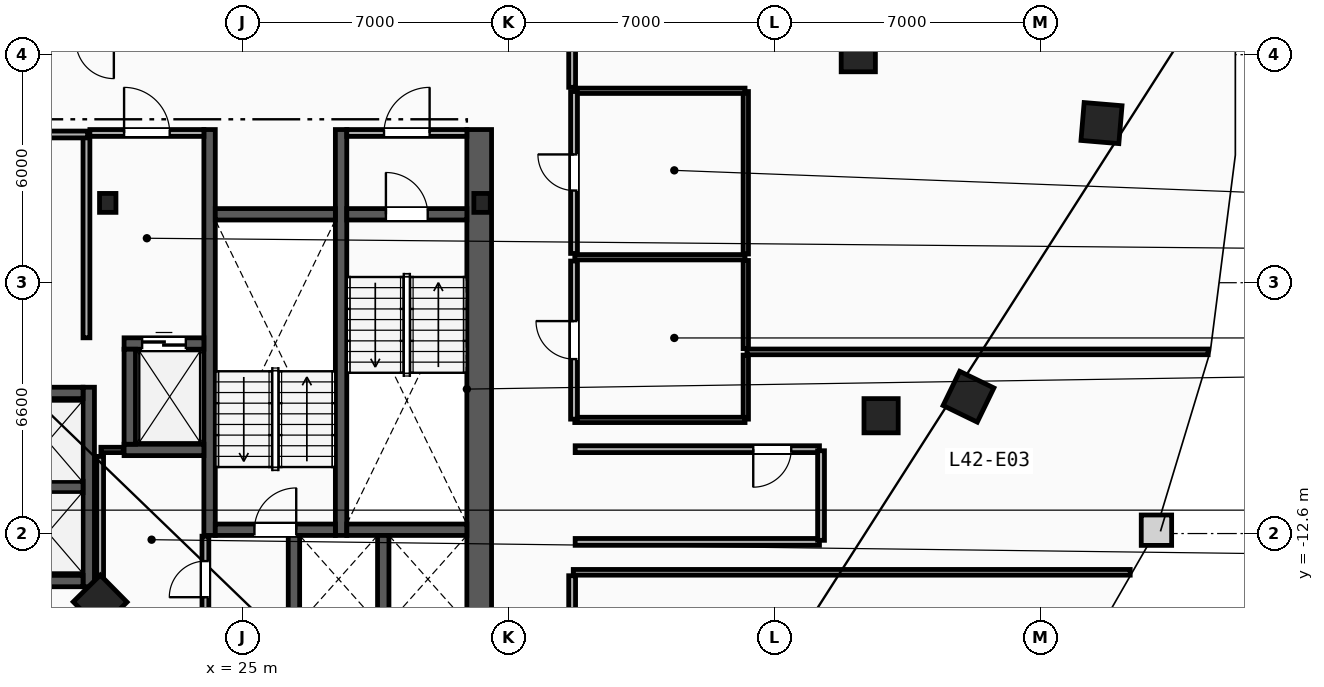
"""IFC4 building model, lengths in metres.
Left out: names, types, materials, properties, quantities, classifications, styles, units other than length and angle.
Written with IfcOpenShell. Run it as: python <this file> out.ifc"""

import sys

from ifc_helpers import new_model, si_unit, direction, frame, frame_2d, origin, origin_2d, place, context, subcontext, project, spatial, rectangle, i_section, extrude, element, fill, save


model = new_model("IFC4")
c1 = context("Model", 3, precision=1e-05, world=origin(), true_north=direction((0.0, 1.0)))
c2 = subcontext(c1, "Body", "Model", "MODEL_VIEW")
j1 = project(units=[si_unit("LENGTHUNIT", "METRE"), si_unit("PLANEANGLEUNIT", "RADIAN")], contexts=[c1])
p1 = place(None, origin())
s1 = spatial("IfcSite", under=j1, at=p1, CompositionType="ELEMENT")
p2 = place(p1, origin())
s2 = spatial("IfcBuilding", under=s1, at=p2, CompositionType="ELEMENT")
p3 = place(p2, frame((0.0, 0.0, 162.0)))
s3 = spatial("IfcBuildingStorey", under=s2, at=p3, CompositionType="ELEMENT", Elevation=162.0)
for number, where, z_axis, x_axis in (
    (1, (31.3, -3.9, 0.0), (0.0, 0.0, 1.0), (1.0, 0.0, 0.0)),
    (2, (21.45, -3.9, 0.0), (0.0, 0.0, 1.0), (1.0, 0.0, 0.0)),
):
    element("IfcColumn", number, at=place(p3, frame(where, z_axis=z_axis, x_axis=x_axis)), inside=s3, PredefinedType="COLUMN", context=c2, shape_type="SweptSolid", body=[
        extrude(i_section(OverallWidth=0.432, OverallDepth=0.498, WebThickness=0.056, FlangeThickness=0.089, FilletRadius=0.018, at=origin_2d()), origin(), (0.0, 0.0, 1.0), 3.6),
    ])
for number, where, z_axis, x_axis in (
    (3, (41.2, 0.0, 0.0), (0.0, 0.0, 1.0), (1.0, 0.0, 0.0)),
    (4, (41.8, -9.5, 0.0), (0.0, 0.0, 1.0), (1.0, 0.0, 0.0)),
):
    element("IfcColumn", number, at=place(p3, frame(where, z_axis=z_axis, x_axis=x_axis)), inside=s3, PredefinedType="COLUMN", context=c2, shape_type="SweptSolid", body=[
        extrude(rectangle(XDim=0.9, YDim=0.9, at=origin_2d()), origin(), (0.0, 0.0, 1.0), 3.6),
    ])
for number, where, z_axis, x_axis in (
    (5, (21.25, -14.4, 0.0), (0.0, 0.0, 1.0), (0.703, -0.711, 0.0)),
    (6, (44.1, -9.0, 0.0), (0.0, 0.0, 1.0), (0.437, 0.899, 0.0)),
    (7, (47.6, -1.8, 0.0), (0.0, 0.0, 1.0), (0.084, 0.997, 0.0)),
):
    element("IfcColumn", number, at=place(p3, frame(where, z_axis=z_axis, x_axis=x_axis)), inside=s3, PredefinedType="COLUMN", context=c2, shape_type="SweptSolid", body=[
        extrude(rectangle(XDim=1.0, YDim=1.0, at=origin_2d()), origin(), (0.0, 0.0, 1.0), 3.6),
    ])
p4 = place(p3, frame((31.225, -15.3, 0.0), z_axis=(0.0, 0.0, 1.0), x_axis=(0.0, 1.0, 0.0)))
e8 = element("IfcWall", 8, at=p4, inside=s3, PredefinedType="SHEAR", context=c2, shape_type="SweptSolid", body=[
    extrude(rectangle(XDim=13.33, YDim=0.65, at=frame_2d((6.665, 0.0))), origin(), (0.0, 0.0, 1.0), 3.36),
])
for number, where, z_axis, x_axis in (
    (9, (27.59, -12.65, 0.0), (0.0, 0.0, 1.0), (0.0, 1.0, 0.0)),
    (10, (24.13, -12.65, 0.0), (0.0, 0.0, 1.0), (0.0, 1.0, 0.0)),
):
    element("IfcWall", number, at=place(p3, frame(where, z_axis=z_axis, x_axis=x_axis)), inside=s3, PredefinedType="SHEAR", context=c2, shape_type="SweptSolid", body=[
        extrude(rectangle(XDim=10.68, YDim=0.3, at=frame_2d((5.34, 0.0))), origin(), (0.0, 0.0, 1.0), 3.36),
    ])
p5 = place(p3, frame((27.74, -4.2, 0.0), z_axis=(0.0, 0.0, 1.0), x_axis=(1.0, 0.0, 0.0)))
e11 = element("IfcWall", 11, at=p5, inside=s3, PredefinedType="SHEAR", context=c2, shape_type="SweptSolid", body=[
    extrude(rectangle(XDim=3.16, YDim=0.3, at=frame_2d((1.58, 0.0))), origin(), (0.0, 0.0, 1.0), 3.36),
])
p6 = place(p5, frame((1.03, 0.0, 0.0)))
e12 = element("IfcOpeningElement", 12, at=p6, cuts=e11, PredefinedType="OPENING", context=c2, shape_type="SweptSolid", body=[
    extrude(rectangle(XDim=1.1, YDim=2.15, at=frame_2d((0.55, 1.075))), frame((0.0, 0.16, 0.0), z_axis=(0.0, -1.0, 0.0), x_axis=(1.0, 0.0, 0.0)), (0.0, 0.0, 1.0), 0.32),
])
p7 = place(p3, frame((27.74, -12.5, 0.0), z_axis=(0.0, 0.0, 1.0), x_axis=(1.0, 0.0, 0.0)))
e13 = element("IfcWall", 13, at=p7, inside=s3, PredefinedType="SHEAR", context=c2, shape_type="SweptSolid", body=[
    extrude(rectangle(XDim=3.16, YDim=0.3, at=frame_2d((1.58, 0.0))), origin(), (0.0, 0.0, 1.0), 3.36),
])
p8 = place(p3, frame((24.28, -12.5, 0.0), z_axis=(0.0, 0.0, 1.0), x_axis=(1.0, 0.0, 0.0)))
e14 = element("IfcWall", 14, at=p8, inside=s3, PredefinedType="SHEAR", context=c2, shape_type="SweptSolid", body=[
    extrude(rectangle(XDim=3.16, YDim=0.3, at=frame_2d((1.58, 0.0))), origin(), (0.0, 0.0, 1.0), 3.36),
])
p9 = place(p8, frame((1.03, 0.0, 0.0)))
e15 = element("IfcOpeningElement", 15, at=p9, cuts=e14, PredefinedType="OPENING", context=c2, shape_type="SweptSolid", body=[
    extrude(rectangle(XDim=1.1, YDim=2.15, at=frame_2d((0.55, 1.075))), frame((0.0, 0.16, 0.0), z_axis=(0.0, -1.0, 0.0), x_axis=(1.0, 0.0, 0.0)), (0.0, 0.0, 1.0), 0.32),
])
p10 = place(p3, frame((24.28, -4.2, 0.0), z_axis=(0.0, 0.0, 1.0), x_axis=(1.0, 0.0, 0.0)))
e16 = element("IfcWall", 16, at=p10, inside=s3, PredefinedType="SHEAR", context=c2, shape_type="SweptSolid", body=[
    extrude(rectangle(XDim=3.16, YDim=0.3, at=frame_2d((1.58, 0.0))), origin(), (0.0, 0.0, 1.0), 3.36),
])
p11 = place(p3, frame((20.89, -7.45, 0.0), z_axis=(0.0, 0.0, 1.0), x_axis=(0.0, 1.0, 0.0)))
e17 = element("IfcWall", 17, at=p11, inside=s3, PredefinedType="PARTITIONING", context=c2, shape_type="SweptSolid", body=[
    extrude(rectangle(XDim=5.3, YDim=0.18, at=frame_2d((2.65, 0.0))), origin(), (0.0, 0.0, 1.0), 3.36),
])
p12 = place(p3, frame((20.98, -2.06, 0.0), z_axis=(0.0, 0.0, 1.0), x_axis=(1.0, 0.0, 0.0)))
e18 = element("IfcWall", 18, at=p12, inside=s3, PredefinedType="PARTITIONING", context=c2, shape_type="SweptSolid", body=[
    extrude(rectangle(XDim=3.0, YDim=0.18, at=frame_2d((1.5, 0.0))), origin(), (0.0, 0.0, 1.0), 3.36),
])
p13 = place(p12, frame((0.9, 0.0, 0.0)))
e19 = element("IfcOpeningElement", 19, at=p13, cuts=e18, PredefinedType="OPENING", context=c2, shape_type="SweptSolid", body=[
    extrude(rectangle(XDim=1.2, YDim=2.15, at=frame_2d((0.6, 1.075))), frame((0.0, 0.1, 0.0), z_axis=(0.0, -1.0, 0.0), x_axis=(1.0, 0.0, 0.0)), (0.0, 0.0, 1.0), 0.2),
])
p14 = place(p3, frame((27.74, -2.06, 0.0), z_axis=(0.0, 0.0, 1.0), x_axis=(1.0, 0.0, 0.0)))
e20 = element("IfcWall", 20, at=p14, inside=s3, PredefinedType="PARTITIONING", context=c2, shape_type="SweptSolid", body=[
    extrude(rectangle(XDim=3.16, YDim=0.18, at=frame_2d((1.58, 0.0))), origin(), (0.0, 0.0, 1.0), 3.36),
])
p15 = place(p14, frame((0.98, 0.0, 0.0)))
e21 = element("IfcOpeningElement", 21, at=p15, cuts=e20, PredefinedType="OPENING", context=c2, shape_type="SweptSolid", body=[
    extrude(rectangle(XDim=1.2, YDim=2.15, at=frame_2d((0.6, 1.075))), frame((0.0, 0.1, 0.0), z_axis=(0.0, -1.0, 0.0), x_axis=(1.0, 0.0, 0.0)), (0.0, 0.0, 1.0), 0.2),
])
p16 = place(p3, frame((21.88, -7.6, 0.0), z_axis=(0.0, 0.0, 1.0), x_axis=(1.0, 0.0, 0.0)))
e22 = element("IfcWall", 22, at=p16, inside=s3, PredefinedType="SHEAR", context=c2, shape_type="SweptSolid", body=[
    extrude(rectangle(XDim=2.1, YDim=0.3, at=frame_2d((1.05, 0.0))), origin(), (0.0, 0.0, 1.0), 3.36),
])
p17 = place(p16, frame((0.475, 0.0, 0.0)))
e23 = element("IfcOpeningElement", 23, at=p17, cuts=e22, PredefinedType="OPENING", context=c2, shape_type="SweptSolid", body=[
    extrude(rectangle(XDim=1.15, YDim=2.2, at=frame_2d((0.575, 1.1))), frame((0.0, 0.16, 0.0), z_axis=(0.0, -1.0, 0.0), x_axis=(1.0, 0.0, 0.0)), (0.0, 0.0, 1.0), 0.32),
])
p18 = place(p3, frame((21.88, -10.4, 0.0), z_axis=(0.0, 0.0, 1.0), x_axis=(1.0, 0.0, 0.0)))
e24 = element("IfcWall", 24, at=p18, inside=s3, PredefinedType="SHEAR", context=c2, shape_type="SweptSolid", body=[
    extrude(rectangle(XDim=2.1, YDim=0.3, at=frame_2d((1.05, 0.0))), origin(), (0.0, 0.0, 1.0), 3.36),
])
p19 = place(p3, frame((22.03, -10.25, 0.0), z_axis=(0.0, 0.0, 1.0), x_axis=(0.0, 1.0, 0.0)))
e25 = element("IfcWall", 25, at=p19, inside=s3, PredefinedType="SHEAR", context=c2, shape_type="SweptSolid", body=[
    extrude(rectangle(XDim=2.5, YDim=0.3, at=frame_2d((1.25, 0.0))), origin(), (0.0, 0.0, 1.0), 3.36),
])
for number, where, z_axis, x_axis in (
    (26, (28.7, -14.95, 0.0), (0.0, 0.0, 1.0), (0.0, 1.0, 0.0)),
    (27, (26.35, -14.95, 0.0), (0.0, 0.0, 1.0), (0.0, 1.0, 0.0)),
):
    element("IfcWall", number, at=place(p3, frame(where, z_axis=z_axis, x_axis=x_axis)), inside=s3, PredefinedType="SHEAR", context=c2, shape_type="SweptSolid", body=[
        extrude(rectangle(XDim=2.3, YDim=0.3, at=frame_2d((1.15, 0.0))), origin(), (0.0, 0.0, 1.0), 3.36),
    ])
p20 = place(p3, frame((20.95, -14.0, 0.0), z_axis=(0.0, 0.0, 1.0), x_axis=(0.0, 1.0, 0.0)))
e28 = element("IfcWall", 28, at=p20, inside=s3, PredefinedType="SHEAR", context=c2, shape_type="SweptSolid", body=[
    extrude(rectangle(XDim=5.25, YDim=0.3, at=frame_2d((2.625, 0.0))), origin(), (0.0, 0.0, 1.0), 3.36),
])
p21 = place(p3, frame((18.95, -13.85, 0.0), z_axis=(0.0, 0.0, 1.0), x_axis=(1.0, 0.0, 0.0)))
e29 = element("IfcWall", 29, at=p21, inside=s3, PredefinedType="SHEAR", context=c2, shape_type="SweptSolid", body=[
    extrude(rectangle(XDim=1.85, YDim=0.3, at=frame_2d((0.925, 0.0))), origin(), (0.0, 0.0, 1.0), 3.36),
])
p22 = place(p3, frame((18.65, -8.9, 0.0), z_axis=(0.0, 0.0, 1.0), x_axis=(1.0, 0.0, 0.0)))
e30 = element("IfcWall", 30, at=p22, inside=s3, PredefinedType="SHEAR", context=c2, shape_type="SweptSolid", body=[
    extrude(rectangle(XDim=2.15, YDim=0.3, at=frame_2d((1.075, 0.0))), origin(), (0.0, 0.0, 1.0), 3.36),
])
p23 = place(p3, frame((18.95, -11.375, 0.0), z_axis=(0.0, 0.0, 1.0), x_axis=(1.0, 0.0, 0.0)))
e31 = element("IfcWall", 31, at=p23, inside=s3, PredefinedType="SHEAR", context=c2, shape_type="SweptSolid", body=[
    extrude(rectangle(XDim=1.85, YDim=0.3, at=frame_2d((0.925, 0.0))), origin(), (0.0, 0.0, 1.0), 3.36),
])
p24 = place(p3, frame((21.27, -10.4, 0.0), z_axis=(0.0, 0.0, 1.0), x_axis=(1.0, 0.0, 0.0)))
e32 = element("IfcWall", 32, at=p24, inside=s3, PredefinedType="PARTITIONING", context=c2, shape_type="SweptSolid", body=[
    extrude(rectangle(XDim=0.59, YDim=0.14, at=frame_2d((0.295, 0.0))), origin(), (0.0, 0.0, 1.0), 3.36),
])
p25 = place(p3, frame((21.25, -14.93, 0.0), z_axis=(0.0, 0.0, 1.0), x_axis=(0.0, 1.0, 0.0)))
e33 = element("IfcWall", 33, at=p25, inside=s3, PredefinedType="PARTITIONING", context=c2, shape_type="SweptSolid", body=[
    extrude(rectangle(XDim=4.36, YDim=0.18, at=frame_2d((2.18, 0.0))), origin(), (0.0, 0.0, 1.0), 3.36),
])
p26 = place(p3, frame((24.02, -14.93, 0.0), z_axis=(0.0, 0.0, 1.0), x_axis=(0.0, 1.0, 0.0)))
e34 = element("IfcWall", 34, at=p26, inside=s3, PredefinedType="PARTITIONING", context=c2, shape_type="SweptSolid", body=[
    extrude(rectangle(XDim=2.26, YDim=0.18, at=frame_2d((1.13, 0.0))), origin(), (0.0, 0.0, 1.0), 3.36),
])
p27 = place(p26, frame((0.655, 0.0, 0.0)))
e35 = element("IfcOpeningElement", 35, at=p27, cuts=e34, PredefinedType="OPENING", context=c2, shape_type="SweptSolid", body=[
    extrude(rectangle(XDim=0.95, YDim=2.1, at=frame_2d((0.475, 1.05))), frame((0.0, 0.1, 0.0), z_axis=(0.0, -1.0, 0.0), x_axis=(1.0, 0.0, 0.0)), (0.0, 0.0, 1.0), 0.2),
])
p28 = place(p3, frame((38.24, -9.59, 0.0), z_axis=(0.0, 0.0, 1.0), x_axis=(0.0, 1.0, 0.0)))
e36 = element("IfcWall", 36, at=p28, inside=s3, PredefinedType="PARTITIONING", context=c2, shape_type="SweptSolid", body=[
    extrude(rectangle(XDim=1.685, YDim=0.14, at=frame_2d((0.843, 0.0))), origin(), (0.0, 0.0, 1.0), 3.36),
])
p29 = place(p3, frame((38.24, -7.735, 0.0), z_axis=(0.0, 0.0, 1.0), x_axis=(0.0, 1.0, 0.0)))
e37 = element("IfcWall", 37, at=p29, inside=s3, PredefinedType="PARTITIONING", context=c2, shape_type="SweptSolid", body=[
    extrude(rectangle(XDim=2.32, YDim=0.14, at=frame_2d((1.16, 0.0))), origin(), (0.0, 0.0, 1.0), 3.36),
])
p30 = place(p3, frame((38.24, -5.245, 0.0), z_axis=(0.0, 0.0, 1.0), x_axis=(0.0, 1.0, 0.0)))
e38 = element("IfcWall", 38, at=p30, inside=s3, PredefinedType="PARTITIONING", context=c2, shape_type="SweptSolid", body=[
    extrude(rectangle(XDim=4.275, YDim=0.14, at=frame_2d((2.138, 0.0))), origin(), (0.0, 0.0, 1.0), 3.36),
])
for number, where, z_axis, x_axis in (
    (39, (33.74, -0.95, 0.0), (0.0, 0.0, 1.0), (1.0, 0.0, 0.0)),
    (40, (33.74, -5.33, 0.0), (0.0, 0.0, 1.0), (1.0, 0.0, 0.0)),
    (41, (33.74, -9.61, 0.0), (0.0, 0.0, 1.0), (1.0, 0.0, 0.0)),
):
    element("IfcWall", number, at=place(p3, frame(where, z_axis=z_axis, x_axis=x_axis)), inside=s3, PredefinedType="PARTITIONING", context=c2, shape_type="SweptSolid", body=[
        extrude(rectangle(XDim=4.48, YDim=0.14, at=frame_2d((2.24, 0.0))), origin(), (0.0, 0.0, 1.0), 3.36),
    ])
p31 = place(p3, frame((33.72, -5.23, 0.0), z_axis=(0.0, 0.0, 1.0), x_axis=(0.0, 1.0, 0.0)))
e42 = element("IfcWall", 42, at=p31, inside=s3, PredefinedType="PARTITIONING", context=c2, shape_type="SweptSolid", body=[
    extrude(rectangle(XDim=4.26, YDim=0.18, at=frame_2d((2.13, 0.0))), origin(), (0.0, 0.0, 1.0), 3.36),
])
p32 = place(p31, frame((1.655, 0.0, 0.0)))
e43 = element("IfcOpeningElement", 43, at=p32, cuts=e42, PredefinedType="OPENING", context=c2, shape_type="SweptSolid", body=[
    extrude(rectangle(XDim=0.95, YDim=2.1, at=frame_2d((0.475, 1.05))), frame((0.0, 0.1, 0.0), z_axis=(0.0, -1.0, 0.0), x_axis=(1.0, 0.0, 0.0)), (0.0, 0.0, 1.0), 0.2),
])
p33 = place(p3, frame((33.72, -9.59, 0.0), z_axis=(0.0, 0.0, 1.0), x_axis=(0.0, 1.0, 0.0)))
e44 = element("IfcWall", 44, at=p33, inside=s3, PredefinedType="PARTITIONING", context=c2, shape_type="SweptSolid", body=[
    extrude(rectangle(XDim=4.16, YDim=0.18, at=frame_2d((2.08, 0.0))), origin(), (0.0, 0.0, 1.0), 3.36),
])
p34 = place(p33, frame((1.58, 0.0, 0.0)))
e45 = element("IfcOpeningElement", 45, at=p34, cuts=e44, PredefinedType="OPENING", context=c2, shape_type="SweptSolid", body=[
    extrude(rectangle(XDim=1.0, YDim=2.15, at=frame_2d((0.5, 1.075))), frame((0.0, 0.1, 0.0), z_axis=(0.0, -1.0, 0.0), x_axis=(1.0, 0.0, 0.0)), (0.0, 0.0, 1.0), 0.2),
])
p35 = place(p3, frame((38.27, -7.82, 0.0), z_axis=(0.0, 0.0, 1.0), x_axis=(1.0, 0.0, 0.0)))
e46 = element("IfcWall", 46, at=p35, inside=s3, PredefinedType="PARTITIONING", context=c2, shape_type="SweptSolid", body=[
    extrude(rectangle(XDim=12.136, YDim=0.15, at=frame_2d((6.068, 0.0))), origin(), (0.0, 0.0, 1.0), 3.36),
])
p36 = place(p3, frame((33.7, -13.62, 0.0), z_axis=(0.0, 0.0, 1.0), x_axis=(1.0, 0.0, 0.0)))
e47 = element("IfcWall", 47, at=p36, inside=s3, PredefinedType="PARTITIONING", context=c2, shape_type="SweptSolid", body=[
    extrude(rectangle(XDim=14.656, YDim=0.15, at=frame_2d((7.328, 0.0))), origin(), (0.0, 0.0, 1.0), 3.36),
])
p37 = place(p3, frame((33.67, -17.428, 0.0), z_axis=(0.0, 0.0, 1.0), x_axis=(0.0, 1.0, 0.0)))
e48 = element("IfcWall", 48, at=p37, inside=s3, PredefinedType="PARTITIONING", context=c2, shape_type="SweptSolid", body=[
    extrude(rectangle(XDim=3.719, YDim=0.18, at=frame_2d((1.859, 0.0))), origin(), (0.0, 0.0, 1.0), 3.36),
])
p38 = place(p37, frame((1.359, 0.0, 0.0)))
e49 = element("IfcOpeningElement", 49, at=p38, cuts=e48, PredefinedType="OPENING", context=c2, shape_type="SweptSolid", body=[
    extrude(rectangle(XDim=1.0, YDim=2.15, at=frame_2d((0.5, 1.075))), frame((0.0, 0.1, 0.0), z_axis=(0.0, -1.0, 0.0), x_axis=(1.0, 0.0, 0.0)), (0.0, 0.0, 1.0), 0.2),
])
p39 = place(p3, frame((33.75, -12.82, 0.0), z_axis=(0.0, 0.0, 1.0), x_axis=(1.0, 0.0, 0.0)))
e50 = element("IfcWall", 50, at=p39, inside=s3, PredefinedType="PARTITIONING", context=c2, shape_type="SweptSolid", body=[
    extrude(rectangle(XDim=6.428, YDim=0.18, at=frame_2d((3.214, 0.0))), origin(), (0.0, 0.0, 1.0), 3.36),
])
p40 = place(p3, frame((40.178, -10.38, 0.0), z_axis=(0.0, 0.0, 1.0), x_axis=(-1.0, 0.0, 0.0)))
e51 = element("IfcWall", 51, at=p40, inside=s3, PredefinedType="PARTITIONING", context=c2, shape_type="SweptSolid", body=[
    extrude(rectangle(XDim=6.428, YDim=0.18, at=frame_2d((3.214, 0.0))), origin(), (0.0, 0.0, 1.0), 3.36),
])
p41 = place(p40, frame((0.743, 0.0, 0.0)))
e52 = element("IfcOpeningElement", 52, at=p41, cuts=e51, PredefinedType="OPENING", context=c2, shape_type="SweptSolid", body=[
    extrude(rectangle(XDim=1.0, YDim=2.15, at=frame_2d((0.5, 1.075))), frame((0.0, 0.1, 0.0), z_axis=(0.0, -1.0, 0.0), x_axis=(1.0, 0.0, 0.0)), (0.0, 0.0, 1.0), 0.2),
])
p42 = place(p3, frame((40.22, -12.779, 0.0), z_axis=(0.0, 0.0, 1.0), x_axis=(0.0, 1.0, 0.0)))
e53 = element("IfcWall", 53, at=p42, inside=s3, PredefinedType="PARTITIONING", context=c2, shape_type="SweptSolid", body=[
    extrude(rectangle(XDim=2.357, YDim=0.18, at=frame_2d((1.179, 0.0))), origin(), (0.0, 0.0, 1.0), 3.36),
])
p43 = place(p3, frame((16.822, -2.1, 0.0), z_axis=(0.0, 0.0, 1.0), x_axis=(1.0, 0.0, 0.0)))
e54 = element("IfcWall", 54, at=p43, inside=s3, PredefinedType="PARTITIONING", context=c2, shape_type="SweptSolid", body=[
    extrude(rectangle(XDim=4.098, YDim=0.18, at=frame_2d((2.049, 0.0))), origin(), (0.0, 0.0, 1.0), 3.36),
])
p44 = place(p3, frame((33.67, -0.859, 0.0), z_axis=(0.0, 0.0, 1.0), x_axis=(0.0, 1.0, 0.0)))
e55 = element("IfcWall", 55, at=p44, inside=s3, PredefinedType="PARTITIONING", context=c2, shape_type="SweptSolid", body=[
    extrude(rectangle(XDim=1.187, YDim=0.18, at=frame_2d((0.594, 0.0))), origin(), (0.0, 0.0, 1.0), 3.36),
])
p45 = place(p6, origin())
e56 = element("IfcDoor", 56, at=p45, inside=s3, OperationType="SINGLE_SWING_LEFT", PredefinedType="DOOR", context=c2, shape_type="SweptSolid", body=[
    extrude(rectangle(XDim=1.1, YDim=2.15, at=frame_2d((0.55, 1.075))), frame((0.0, 0.025, 0.0), z_axis=(0.0, -1.0, 0.0), x_axis=(1.0, 0.0, 0.0)), (0.0, 0.0, 1.0), 0.05),
])
fill(e12, e56)
p46 = place(p9, origin())
e57 = element("IfcDoor", 57, at=p46, inside=s3, OperationType="SINGLE_SWING_RIGHT", PredefinedType="DOOR", context=c2, shape_type="SweptSolid", body=[
    extrude(rectangle(XDim=1.1, YDim=2.15, at=frame_2d((0.55, 1.075))), frame((0.0, 0.025, 0.0), z_axis=(0.0, -1.0, 0.0), x_axis=(1.0, 0.0, 0.0)), (0.0, 0.0, 1.0), 0.05),
])
fill(e15, e57)
p47 = place(p13, origin())
e58 = element("IfcDoor", 58, at=p47, inside=s3, OperationType="SINGLE_SWING_LEFT", PredefinedType="DOOR", context=c2, shape_type="SweptSolid", body=[
    extrude(rectangle(XDim=1.2, YDim=2.15, at=frame_2d((0.6, 1.075))), frame((0.0, 0.025, 0.0), z_axis=(0.0, -1.0, 0.0), x_axis=(1.0, 0.0, 0.0)), (0.0, 0.0, 1.0), 0.05),
])
fill(e19, e58)
p48 = place(p15, origin())
e59 = element("IfcDoor", 59, at=p48, inside=s3, OperationType="SINGLE_SWING_RIGHT", PredefinedType="DOOR", context=c2, shape_type="SweptSolid", body=[
    extrude(rectangle(XDim=1.2, YDim=2.15, at=frame_2d((0.6, 1.075))), frame((0.0, 0.025, 0.0), z_axis=(0.0, -1.0, 0.0), x_axis=(1.0, 0.0, 0.0)), (0.0, 0.0, 1.0), 0.05),
])
fill(e21, e59)
p49 = place(p17, origin())
e60 = element("IfcDoor", 60, at=p49, inside=s3, OperationType="SLIDING_TO_LEFT", PredefinedType="TRAPDOOR", context=c2, shape_type="SweptSolid", body=[
    extrude(rectangle(XDim=1.15, YDim=2.2, at=frame_2d((0.575, 1.1))), frame((0.0, 0.025, 0.0), z_axis=(0.0, -1.0, 0.0), x_axis=(1.0, 0.0, 0.0)), (0.0, 0.0, 1.0), 0.05),
])
fill(e23, e60)
p50 = place(p32, origin())
e61 = element("IfcDoor", 61, at=p50, inside=s3, OperationType="SINGLE_SWING_RIGHT", PredefinedType="DOOR", context=c2, shape_type="SweptSolid", body=[
    extrude(rectangle(XDim=0.95, YDim=2.1, at=frame_2d((0.475, 1.05))), frame((0.0, 0.025, 0.0), z_axis=(0.0, -1.0, 0.0), x_axis=(1.0, 0.0, 0.0)), (0.0, 0.0, 1.0), 0.05),
])
fill(e43, e61)
p51 = place(p34, origin())
e62 = element("IfcDoor", 62, at=p51, inside=s3, OperationType="SINGLE_SWING_RIGHT", PredefinedType="DOOR", context=c2, shape_type="SweptSolid", body=[
    extrude(rectangle(XDim=1.0, YDim=2.15, at=frame_2d((0.5, 1.075))), frame((0.0, 0.025, 0.0), z_axis=(0.0, -1.0, 0.0), x_axis=(1.0, 0.0, 0.0)), (0.0, 0.0, 1.0), 0.05),
])
fill(e45, e62)
p52 = place(p27, origin())
e63 = element("IfcDoor", 63, at=p52, inside=s3, OperationType="SINGLE_SWING_LEFT", PredefinedType="DOOR", context=c2, shape_type="SweptSolid", body=[
    extrude(rectangle(XDim=0.95, YDim=2.1, at=frame_2d((0.475, 1.05))), frame((0.0, 0.025, 0.0), z_axis=(0.0, -1.0, 0.0), x_axis=(1.0, 0.0, 0.0)), (0.0, 0.0, 1.0), 0.05),
])
fill(e35, e63)
p53 = place(p41, origin())
e64 = element("IfcDoor", 64, at=p53, inside=s3, OperationType="SINGLE_SWING_RIGHT", PredefinedType="DOOR", context=c2, shape_type="SweptSolid", body=[
    extrude(rectangle(XDim=1.0, YDim=2.15, at=frame_2d((0.5, 1.075))), frame((0.0, 0.025, 0.0), z_axis=(0.0, -1.0, 0.0), x_axis=(1.0, 0.0, 0.0)), (0.0, 0.0, 1.0), 0.05),
])
fill(e52, e64)
save(model, sys.argv[1])
